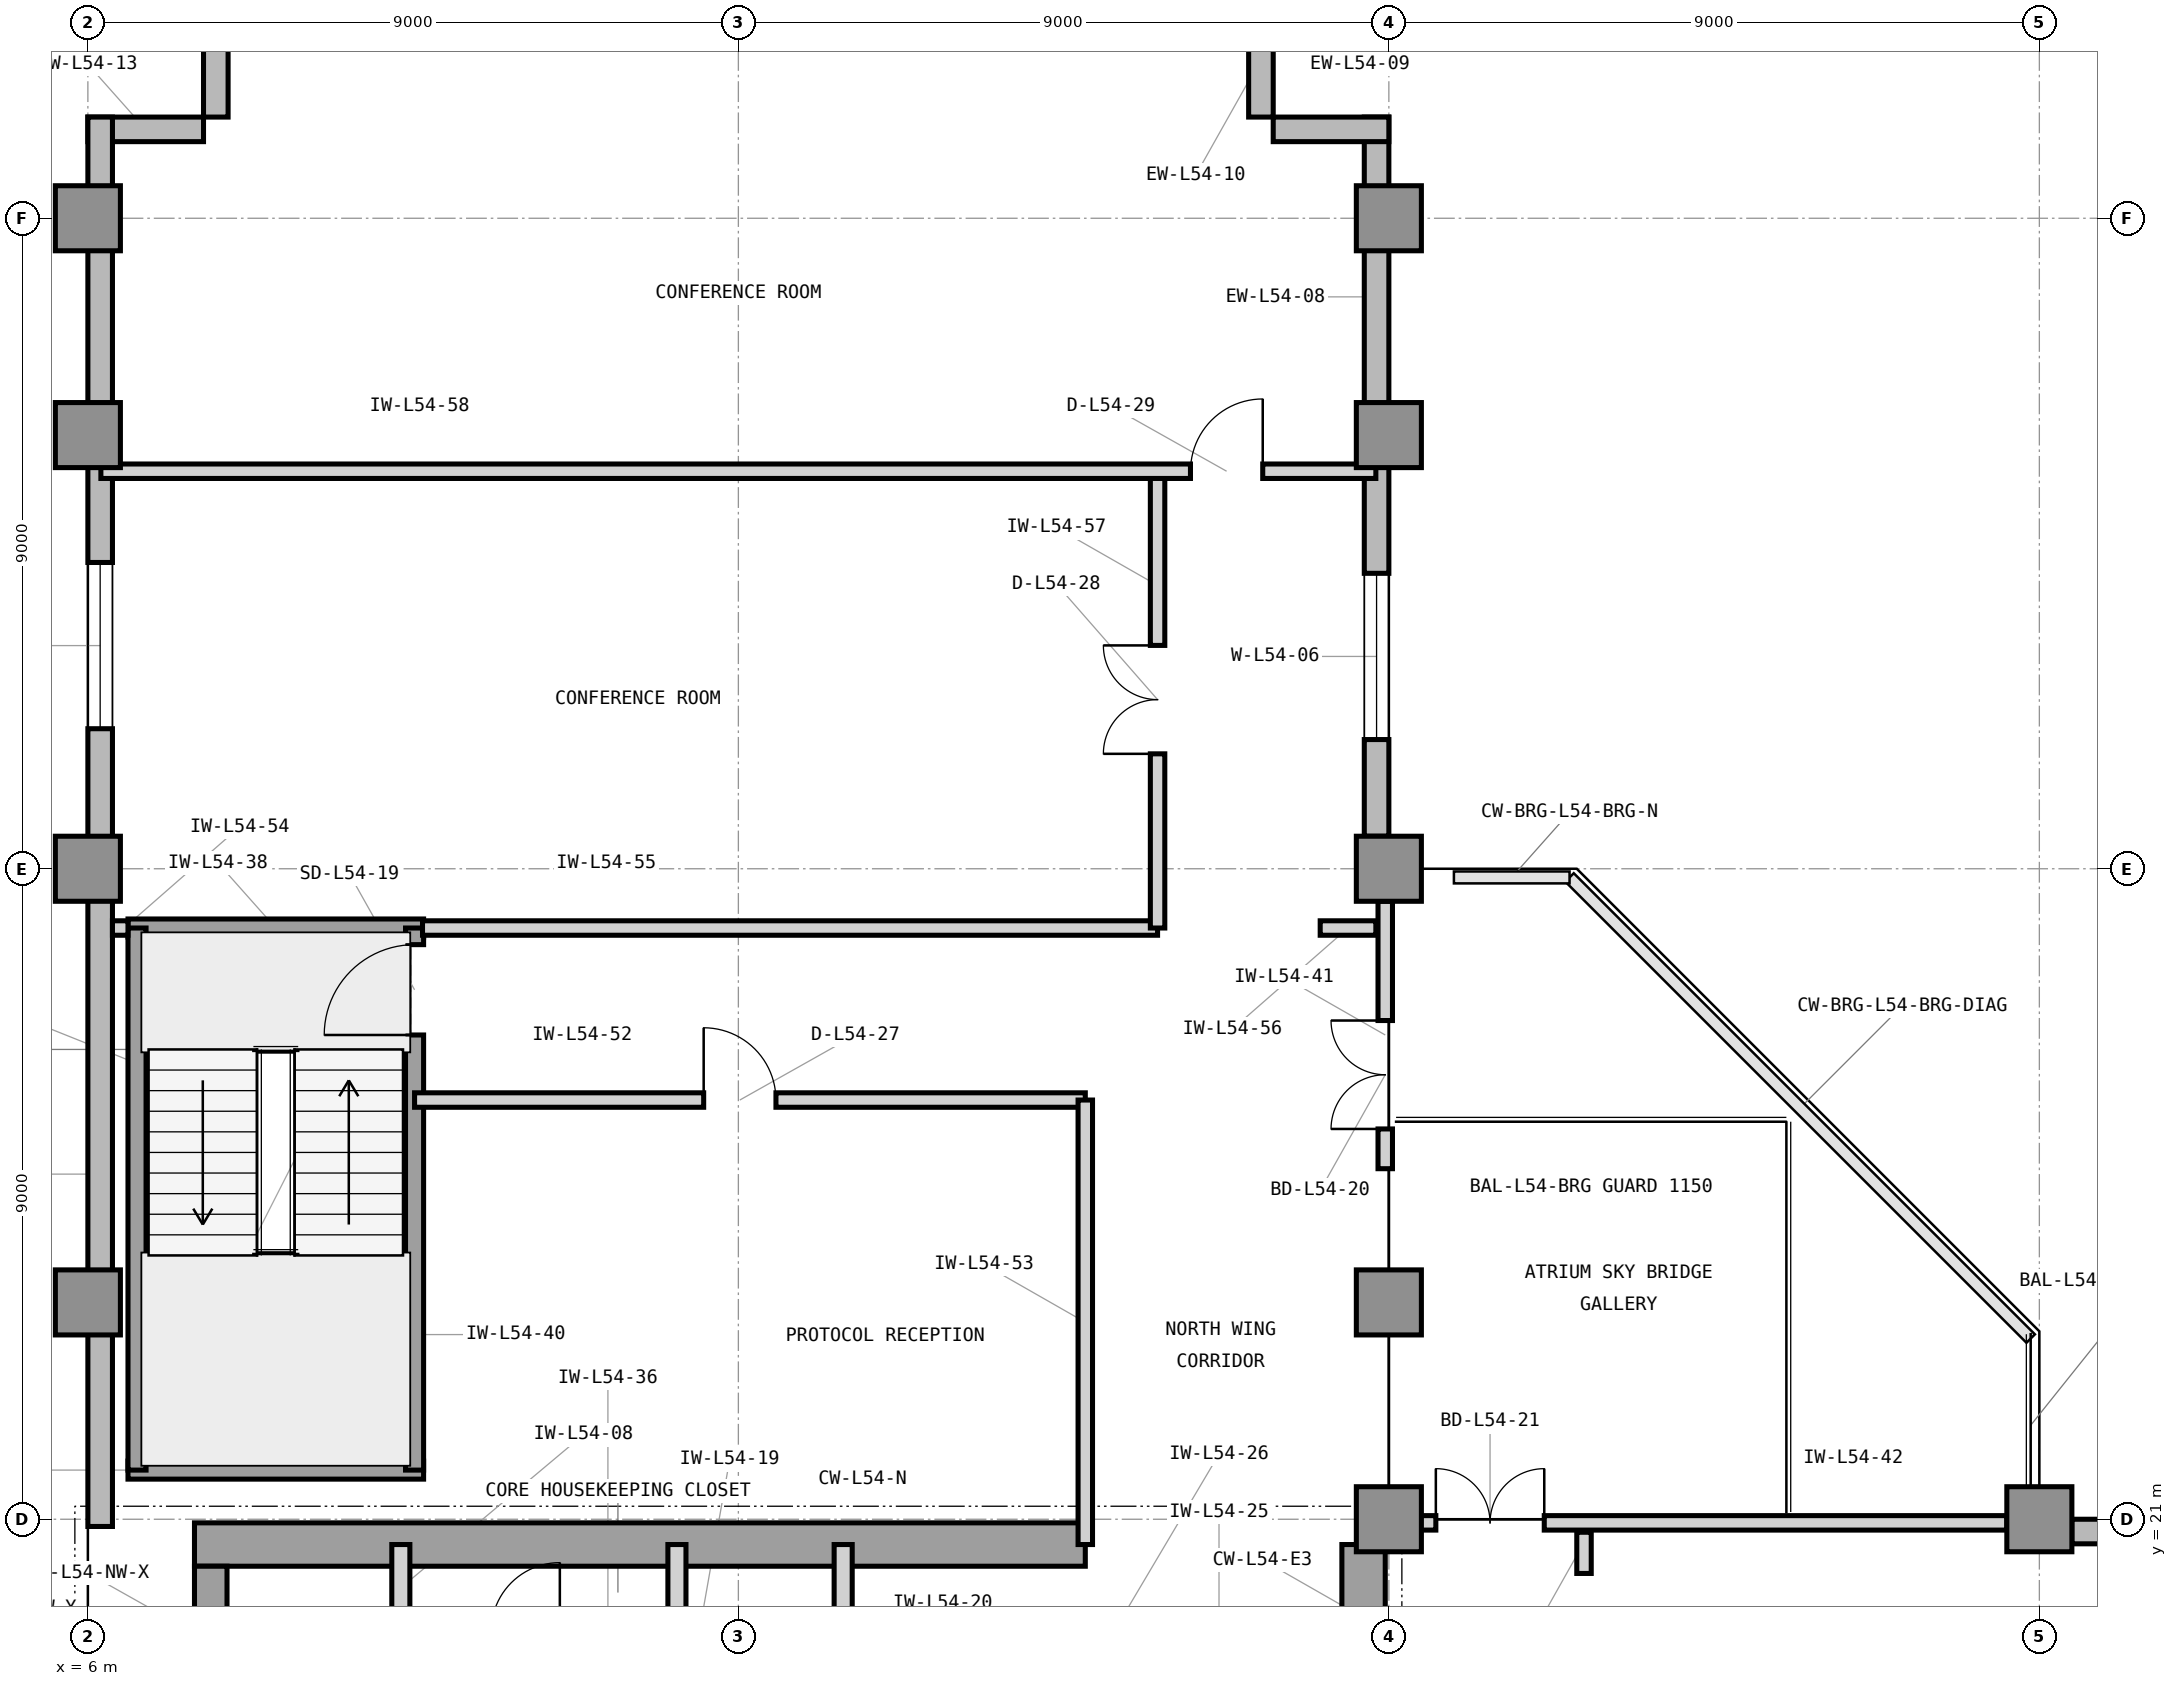
"""IFC4 building model, lengths in metres.
Left out: names, types, materials, properties, quantities, classifications, styles, units other than length and angle.
Written with IfcOpenShell. Run it as: python <this file> out.ifc"""

import sys

from ifc_helpers import new_model, si_unit, direction, frame, frame_2d, origin, origin_2d, place, context, subcontext, project, spatial, rectangle, extrude, element, fill, save


model = new_model("IFC4")
c1 = context("Model", 3, precision=1e-05, world=origin(), true_north=direction((0.0, 1.0)))
c2 = subcontext(c1, "Body", "Model", "MODEL_VIEW")
j1 = project(units=[si_unit("LENGTHUNIT", "METRE"), si_unit("PLANEANGLEUNIT", "RADIAN")], contexts=[c1])
p1 = place(None, origin())
s1 = spatial("IfcSite", under=j1, at=p1, CompositionType="ELEMENT")
p2 = place(p1, origin())
s2 = spatial("IfcBuilding", under=s1, at=p2, CompositionType="ELEMENT")
p3 = place(p2, frame((0.0, 0.0, 222.9)))
s3 = spatial("IfcBuildingStorey", under=s2, at=p3, CompositionType="ELEMENT", Elevation=222.9)
p4 = place(p3, frame((7.475, 20.65, 0.0), z_axis=(0.0, 0.0, 1.0), x_axis=(1.0, 0.0, 0.0)))
e1 = element("IfcWall", 1, at=p4, inside=s3, PredefinedType="SHEAR", context=c2, shape_type="SweptSolid", body=[
    extrude(rectangle(XDim=12.325, YDim=0.6, at=frame_2d((6.163, 0.0))), origin(), (0.0, 0.0, 1.0), 3.9),
])
p5 = place(p3, frame((23.65, 16.6, 0.0), z_axis=(0.0, 0.0, 1.0), x_axis=(0.0, 1.0, 0.0)))
e2 = element("IfcWall", 2, at=p5, inside=s3, PredefinedType="SHEAR", context=c2, shape_type="SweptSolid", body=[
    extrude(rectangle(XDim=4.05, YDim=0.6, at=frame_2d((2.025, 0.0))), origin(), (0.0, 0.0, 1.0), 3.9),
])
p6 = place(p3, frame((7.7, 19.575, 0.0), z_axis=(0.0, 0.0, 1.0), x_axis=(0.0, 1.0, 0.0)))
e3 = element("IfcWall", 3, at=p6, inside=s3, PredefinedType="SHEAR", context=c2, shape_type="SweptSolid", body=[
    extrude(rectangle(XDim=0.775, YDim=0.45, at=frame_2d((0.388, 0.0))), origin(), (0.0, 0.0, 1.0), 3.9),
])
for number, where, z_axis, x_axis in (
    (4, (24.0, 21.0, 0.0), (0.0, 0.0, 1.0), (1.0, 0.0, 0.0)),
    (5, (33.0, 21.0, 0.0), (0.0, 0.0, 1.0), (1.0, 0.0, 0.0)),
    (6, (6.0, 24.0, 0.0), (0.0, 0.0, 1.0), (1.0, 0.0, 0.0)),
    (7, (24.0, 24.0, 0.0), (0.0, 0.0, 1.0), (1.0, 0.0, 0.0)),
    (8, (6.0, 30.0, 0.0), (0.0, 0.0, 1.0), (1.0, 0.0, 0.0)),
    (9, (24.0, 30.0, 0.0), (0.0, 0.0, 1.0), (1.0, 0.0, 0.0)),
    (10, (6.0, 36.0, 0.0), (0.0, 0.0, 1.0), (1.0, 0.0, 0.0)),
    (11, (24.0, 36.0, 0.0), (0.0, 0.0, 1.0), (1.0, 0.0, 0.0)),
    (12, (6.0, 39.0, 0.0), (0.0, 0.0, 1.0), (1.0, 0.0, 0.0)),
    (13, (24.0, 39.0, 0.0), (0.0, 0.0, 1.0), (1.0, 0.0, 0.0)),
):
    element("IfcColumn", number, at=place(p3, frame(where, z_axis=z_axis, x_axis=x_axis)), inside=s3, PredefinedType="COLUMN", context=c2, shape_type="SweptSolid", body=[
        extrude(rectangle(XDim=0.9, YDim=0.9, at=origin_2d()), origin(), (0.0, 0.0, 1.0), 3.9),
    ])
p7 = place(p3, frame((55.4, 20.83, 0.0), z_axis=(0.0, 0.0, 1.0), x_axis=(-1.0, 0.0, 0.0)))
e14 = element("IfcWall", 14, at=p7, inside=s3, PredefinedType="STANDARD", context=c2, shape_type="SweptSolid", body=[
    extrude(rectangle(XDim=21.95, YDim=0.34, at=frame_2d((10.975, 0.0))), origin(), (0.0, 0.0, 1.0), 3.62),
])
p8 = place(p7, frame((18.406, 0.0, 0.9)))
e15 = element("IfcOpeningElement", 15, at=p8, cuts=e14, PredefinedType="OPENING", context=c2, shape_type="SweptSolid", body=[
    extrude(rectangle(XDim=1.6, YDim=2.2, at=frame_2d((0.8, 1.1))), frame((0.0, 0.18, 0.0), z_axis=(0.0, -1.0, 0.0), x_axis=(1.0, 0.0, 0.0)), (0.0, 0.0, 1.0), 0.36),
])
p9 = place(p3, frame((23.83, 30.45, 0.0), z_axis=(0.0, 0.0, 1.0), x_axis=(0.0, 1.0, 0.0)))
e16 = element("IfcWall", 16, at=p9, inside=s3, PredefinedType="STANDARD", context=c2, shape_type="SweptSolid", body=[
    extrude(rectangle(XDim=9.95, YDim=0.34, at=frame_2d((4.975, 0.0))), origin(), (0.0, 0.0, 1.0), 3.62),
])
p10 = place(p9, frame((1.337, 0.0, 0.9)))
e17 = element("IfcOpeningElement", 17, at=p10, cuts=e16, PredefinedType="OPENING", context=c2, shape_type="SweptSolid", body=[
    extrude(rectangle(XDim=2.3, YDim=2.2, at=frame_2d((1.15, 1.1))), frame((0.0, 0.18, 0.0), z_axis=(0.0, -1.0, 0.0), x_axis=(1.0, 0.0, 0.0)), (0.0, 0.0, 1.0), 0.36),
])
for number, where, z_axis, x_axis in (
    (18, (24.0, 40.23, 0.0), (0.0, 0.0, 1.0), (-1.0, 0.0, 0.0)),
    (19, (22.23, 40.4, 0.0), (0.0, 0.0, 1.0), (0.0, 1.0, 0.0)),
    (20, (7.77, 42.0, 0.0), (0.0, 0.0, 1.0), (0.0, -1.0, 0.0)),
    (21, (7.6, 40.23, 0.0), (0.0, 0.0, 1.0), (-1.0, 0.0, 0.0)),
):
    element("IfcWall", number, at=place(p3, frame(where, z_axis=z_axis, x_axis=x_axis)), inside=s3, PredefinedType="STANDARD", context=c2, shape_type="SweptSolid", body=[
        extrude(rectangle(XDim=1.6, YDim=0.34, at=frame_2d((0.8, 0.0))), origin(), (0.0, 0.0, 1.0), 3.62),
    ])
p11 = place(p3, frame((6.17, 40.4, 0.0), z_axis=(0.0, 0.0, 1.0), x_axis=(0.0, -1.0, 0.0)))
e22 = element("IfcWall", 22, at=p11, inside=s3, PredefinedType="STANDARD", context=c2, shape_type="SweptSolid", body=[
    extrude(rectangle(XDim=19.5, YDim=0.34, at=frame_2d((9.75, 0.0))), origin(), (0.0, 0.0, 1.0), 3.62),
])
p12 = place(p11, frame((6.163, 0.0, 0.9)))
e23 = element("IfcOpeningElement", 23, at=p12, cuts=e22, PredefinedType="OPENING", context=c2, shape_type="SweptSolid", body=[
    extrude(rectangle(XDim=2.3, YDim=2.2, at=frame_2d((1.15, 1.1))), frame((0.0, 0.18, 0.0), z_axis=(0.0, -1.0, 0.0), x_axis=(1.0, 0.0, 0.0)), (0.0, 0.0, 1.0), 0.36),
])
p13 = place(p3, frame((10.33, 19.45, 0.0), z_axis=(0.0, 0.0, 1.0), x_axis=(0.0, 1.0, 0.0)))
e24 = element("IfcWall", 24, at=p13, inside=s3, PredefinedType="PARTITIONING", context=c2, shape_type="SweptSolid", body=[
    extrude(rectangle(XDim=1.2, YDim=0.25, at=frame_2d((0.6, 0.0))), origin(), (0.0, 0.0, 1.0), 2.837),
])
for number, where, z_axis, x_axis in (
    (25, (14.15, 16.7, 0.0), (0.0, 0.0, 1.0), (0.0, 1.0, 0.0)),
    (26, (16.45, 16.7, 0.0), (0.0, 0.0, 1.0), (0.0, 1.0, 0.0)),
):
    element("IfcWall", number, at=place(p3, frame(where, z_axis=z_axis, x_axis=x_axis)), inside=s3, PredefinedType="PARTITIONING", context=c2, shape_type="SweptSolid", body=[
        extrude(rectangle(XDim=3.95, YDim=0.25, at=frame_2d((1.975, 0.0))), origin(), (0.0, 0.0, 1.0), 3.61),
    ])
for number, where, z_axis, x_axis in (
    (27, (6.555, 21.68, 0.0), (0.0, 0.0, 1.0), (1.0, 0.0, 0.0)),
    (28, (6.555, 29.18, 0.0), (0.0, 0.0, 1.0), (1.0, 0.0, 0.0)),
):
    element("IfcWall", number, at=place(p3, frame(where, z_axis=z_axis, x_axis=x_axis)), inside=s3, PredefinedType="SHEAR", context=c2, shape_type="SweptSolid", body=[
        extrude(rectangle(XDim=4.09, YDim=0.25, at=frame_2d((2.045, 0.0))), origin(), (0.0, 0.0, 1.0), 3.9),
    ])
p14 = place(p3, frame((6.68, 21.68, 0.0), z_axis=(0.0, 0.0, 1.0), x_axis=(0.0, 1.0, 0.0)))
e29 = element("IfcWall", 29, at=p14, inside=s3, PredefinedType="SHEAR", context=c2, shape_type="SweptSolid", body=[
    extrude(rectangle(XDim=7.5, YDim=0.25, at=frame_2d((3.75, 0.0))), origin(), (0.0, 0.0, 1.0), 3.9),
])
p15 = place(p3, frame((10.52, 21.68, 0.0), z_axis=(0.0, 0.0, 1.0), x_axis=(0.0, 1.0, 0.0)))
e30 = element("IfcWall", 30, at=p15, inside=s3, PredefinedType="SHEAR", context=c2, shape_type="SweptSolid", body=[
    extrude(rectangle(XDim=7.5, YDim=0.25, at=frame_2d((3.75, 0.0))), origin(), (0.0, 0.0, 1.0), 3.9),
])
p16 = place(p15, frame((6.02, 0.0, 0.0)))
e31 = element("IfcOpeningElement", 31, at=p16, cuts=e30, PredefinedType="OPENING", context=c2, shape_type="SweptSolid", body=[
    extrude(rectangle(XDim=1.25, YDim=2.2, at=frame_2d((0.625, 1.1))), frame((0.0, 0.135, 0.0), z_axis=(0.0, -1.0, 0.0), x_axis=(1.0, 0.0, 0.0)), (0.0, 0.0, 1.0), 0.27),
])
p17 = place(p3, frame((23.95, 25.85, 0.0), z_axis=(0.0, 0.0, 1.0), x_axis=(0.0, 1.0, 0.0)))
e32 = element("IfcWall", 32, at=p17, inside=s3, PredefinedType="PARTITIONING", context=c2, shape_type="SweptSolid", body=[
    extrude(rectangle(XDim=3.7, YDim=0.2, at=frame_2d((1.85, 0.0))), origin(), (0.0, 0.0, 1.0), 2.993),
])
p18 = place(p17, frame((0.55, 0.0, 0.0)))
e33 = element("IfcOpeningElement", 33, at=p18, cuts=e32, PredefinedType="OPENING", context=c2, shape_type="SweptSolid", body=[
    extrude(rectangle(XDim=1.5, YDim=2.3, at=frame_2d((0.75, 1.15))), frame((0.0, 0.11, 0.0), z_axis=(0.0, -1.0, 0.0), x_axis=(1.0, 0.0, 0.0)), (0.0, 0.0, 1.0), 0.22),
])
p19 = place(p3, frame((24.05, 20.95, 0.0), z_axis=(0.0, 0.0, 1.0), x_axis=(1.0, 0.0, 0.0)))
e34 = element("IfcWall", 34, at=p19, inside=s3, PredefinedType="PARTITIONING", context=c2, shape_type="SweptSolid", body=[
    extrude(rectangle(XDim=8.5, YDim=0.2, at=frame_2d((4.25, 0.0))), origin(), (0.0, 0.0, 1.0), 2.993),
])
p20 = place(p19, frame((0.6, 0.0, 0.0)))
e35 = element("IfcOpeningElement", 35, at=p20, cuts=e34, PredefinedType="OPENING", context=c2, shape_type="SweptSolid", body=[
    extrude(rectangle(XDim=1.5, YDim=2.3, at=frame_2d((0.75, 1.15))), frame((0.0, 0.11, 0.0), z_axis=(0.0, -1.0, 0.0), x_axis=(1.0, 0.0, 0.0)), (0.0, 0.0, 1.0), 0.22),
])
p21 = place(p3, frame((26.7, 20.25, 0.0), z_axis=(0.0, 0.0, 1.0), x_axis=(0.0, 1.0, 0.0)))
e36 = element("IfcWall", 36, at=p21, inside=s3, PredefinedType="PARTITIONING", context=c2, shape_type="SweptSolid", body=[
    extrude(rectangle(XDim=0.57, YDim=0.2, at=frame_2d((0.285, 0.0))), origin(), (0.0, 0.0, 1.0), 3.61),
])
p22 = place(p3, frame((10.52, 26.8, 0.0), z_axis=(0.0, 0.0, 1.0), x_axis=(1.0, 0.0, 0.0)))
e37 = element("IfcWall", 37, at=p22, inside=s3, PredefinedType="PARTITIONING", context=c2, shape_type="SweptSolid", body=[
    extrude(rectangle(XDim=9.28, YDim=0.2, at=frame_2d((4.64, 0.0))), origin(), (0.0, 0.0, 1.0), 3.61),
])
p23 = place(p22, frame((4.0, 0.0, 0.0)))
e38 = element("IfcOpeningElement", 38, at=p23, cuts=e37, PredefinedType="OPENING", context=c2, shape_type="SweptSolid", body=[
    extrude(rectangle(XDim=1.0, YDim=2.15, at=frame_2d((0.5, 1.075))), frame((0.0, 0.11, 0.0), z_axis=(0.0, -1.0, 0.0), x_axis=(1.0, 0.0, 0.0)), (0.0, 0.0, 1.0), 0.22),
])
p24 = place(p3, frame((19.8, 20.65, 0.0), z_axis=(0.0, 0.0, 1.0), x_axis=(0.0, 1.0, 0.0)))
e39 = element("IfcWall", 39, at=p24, inside=s3, PredefinedType="PARTITIONING", context=c2, shape_type="SweptSolid", body=[
    extrude(rectangle(XDim=6.15, YDim=0.2, at=frame_2d((3.075, 0.0))), origin(), (0.0, 0.0, 1.0), 3.61),
])
p25 = place(p3, frame((6.34, 29.18, 0.0), z_axis=(0.0, 0.0, 1.0), x_axis=(1.0, 0.0, 0.0)))
e40 = element("IfcWall", 40, at=p25, inside=s3, PredefinedType="PARTITIONING", context=c2, shape_type="SweptSolid", body=[
    extrude(rectangle(XDim=0.215, YDim=0.2, at=frame_2d((0.107, 0.0))), origin(), (0.0, 0.0, 1.0), 3.61),
])
p26 = place(p3, frame((10.63, 29.18, 0.0), z_axis=(0.0, 0.0, 1.0), x_axis=(1.0, 0.0, 0.0)))
e41 = element("IfcWall", 41, at=p26, inside=s3, PredefinedType="PARTITIONING", context=c2, shape_type="SweptSolid", body=[
    extrude(rectangle(XDim=10.17, YDim=0.2, at=frame_2d((5.085, 0.0))), origin(), (0.0, 0.0, 1.0), 3.61),
])
p27 = place(p3, frame((23.05, 29.18, 0.0), z_axis=(0.0, 0.0, 1.0), x_axis=(1.0, 0.0, 0.0)))
e42 = element("IfcWall", 42, at=p27, inside=s3, PredefinedType="PARTITIONING", context=c2, shape_type="SweptSolid", body=[
    extrude(rectangle(XDim=0.77, YDim=0.2, at=frame_2d((0.385, 0.0))), origin(), (0.0, 0.0, 1.0), 3.61),
])
p28 = place(p3, frame((20.8, 29.18, 0.0), z_axis=(0.0, 0.0, 1.0), x_axis=(0.0, 1.0, 0.0)))
e43 = element("IfcWall", 43, at=p28, inside=s3, PredefinedType="PARTITIONING", context=c2, shape_type="SweptSolid", body=[
    extrude(rectangle(XDim=6.32, YDim=0.2, at=frame_2d((3.16, 0.0))), origin(), (0.0, 0.0, 1.0), 3.61),
])
p29 = place(p28, frame((2.41, 0.0, 0.0)))
e44 = element("IfcOpeningElement", 44, at=p29, cuts=e43, PredefinedType="OPENING", context=c2, shape_type="SweptSolid", body=[
    extrude(rectangle(XDim=1.5, YDim=2.3, at=frame_2d((0.75, 1.15))), frame((0.0, 0.11, 0.0), z_axis=(0.0, -1.0, 0.0), x_axis=(1.0, 0.0, 0.0)), (0.0, 0.0, 1.0), 0.22),
])
p30 = place(p3, frame((6.18, 35.5, 0.0), z_axis=(0.0, 0.0, 1.0), x_axis=(1.0, 0.0, 0.0)))
e45 = element("IfcWall", 45, at=p30, inside=s3, PredefinedType="PARTITIONING", context=c2, shape_type="SweptSolid", body=[
    extrude(rectangle(XDim=17.64, YDim=0.2, at=frame_2d((8.82, 0.0))), origin(), (0.0, 0.0, 1.0), 3.61),
])
p31 = place(p30, frame((15.075, 0.0, 0.0)))
e46 = element("IfcOpeningElement", 46, at=p31, cuts=e45, PredefinedType="OPENING", context=c2, shape_type="SweptSolid", body=[
    extrude(rectangle(XDim=1.0, YDim=2.15, at=frame_2d((0.5, 1.075))), frame((0.0, 0.11, 0.0), z_axis=(0.0, -1.0, 0.0), x_axis=(1.0, 0.0, 0.0)), (0.0, 0.0, 1.0), 0.22),
])
p32 = place(p10, origin())
e47 = element("IfcWindow", 47, at=p32, inside=s3, PartitioningType="SINGLE_PANEL", PredefinedType="WINDOW", context=c2, shape_type="SweptSolid", body=[
    extrude(rectangle(XDim=2.3, YDim=2.2, at=frame_2d((1.15, 1.1))), frame((0.0, 0.11, 0.0), z_axis=(0.0, -1.0, 0.0), x_axis=(1.0, 0.0, 0.0)), (0.0, 0.0, 1.0), 0.06),
])
fill(e17, e47)
p33 = place(p12, origin())
e48 = element("IfcWindow", 48, at=p33, inside=s3, PartitioningType="SINGLE_PANEL", PredefinedType="WINDOW", context=c2, shape_type="SweptSolid", body=[
    extrude(rectangle(XDim=2.3, YDim=2.2, at=frame_2d((1.15, 1.1))), frame((0.0, 0.11, 0.0), z_axis=(0.0, -1.0, 0.0), x_axis=(1.0, 0.0, 0.0)), (0.0, 0.0, 1.0), 0.06),
])
fill(e23, e48)
p34 = place(p16, origin())
e49 = element("IfcDoor", 49, at=p34, inside=s3, OperationType="SINGLE_SWING_LEFT", PredefinedType="DOOR", context=c2, shape_type="SweptSolid", body=[
    extrude(rectangle(XDim=1.25, YDim=2.2, at=frame_2d((0.625, 1.1))), frame((0.0, 0.025, 0.0), z_axis=(0.0, -1.0, 0.0), x_axis=(1.0, 0.0, 0.0)), (0.0, 0.0, 1.0), 0.05),
])
fill(e31, e49)
p35 = place(p18, origin())
e50 = element("IfcDoor", 50, at=p35, inside=s3, OperationType="DOUBLE_DOOR_SINGLE_SWING", PredefinedType="DOOR", context=c2, shape_type="SweptSolid", body=[
    extrude(rectangle(XDim=1.5, YDim=2.3, at=frame_2d((0.75, 1.15))), frame((0.0, 0.025, 0.0), z_axis=(0.0, -1.0, 0.0), x_axis=(1.0, 0.0, 0.0)), (0.0, 0.0, 1.0), 0.05),
])
fill(e33, e50)
p36 = place(p20, origin())
e51 = element("IfcDoor", 51, at=p36, inside=s3, OperationType="DOUBLE_DOOR_SINGLE_SWING", PredefinedType="DOOR", context=c2, shape_type="SweptSolid", body=[
    extrude(rectangle(XDim=1.5, YDim=2.3, at=frame_2d((0.75, 1.15))), frame((0.0, 0.025, 0.0), z_axis=(0.0, -1.0, 0.0), x_axis=(1.0, 0.0, 0.0)), (0.0, 0.0, 1.0), 0.05),
])
fill(e35, e51)
p37 = place(p23, origin())
e52 = element("IfcDoor", 52, at=p37, inside=s3, OperationType="SINGLE_SWING_LEFT", PredefinedType="DOOR", context=c2, shape_type="SweptSolid", body=[
    extrude(rectangle(XDim=1.0, YDim=2.15, at=frame_2d((0.5, 1.075))), frame((0.0, 0.025, 0.0), z_axis=(0.0, -1.0, 0.0), x_axis=(1.0, 0.0, 0.0)), (0.0, 0.0, 1.0), 0.05),
])
fill(e38, e52)
p38 = place(p29, origin())
e53 = element("IfcDoor", 53, at=p38, inside=s3, OperationType="DOUBLE_DOOR_SINGLE_SWING", PredefinedType="DOOR", context=c2, shape_type="SweptSolid", body=[
    extrude(rectangle(XDim=1.5, YDim=2.3, at=frame_2d((0.75, 1.15))), frame((0.0, 0.025, 0.0), z_axis=(0.0, -1.0, 0.0), x_axis=(1.0, 0.0, 0.0)), (0.0, 0.0, 1.0), 0.05),
])
fill(e44, e53)
p39 = place(p31, origin())
e54 = element("IfcDoor", 54, at=p39, inside=s3, OperationType="SINGLE_SWING_RIGHT", PredefinedType="DOOR", context=c2, shape_type="SweptSolid", body=[
    extrude(rectangle(XDim=1.0, YDim=2.15, at=frame_2d((0.5, 1.075))), frame((0.0, 0.025, 0.0), z_axis=(0.0, -1.0, 0.0), x_axis=(1.0, 0.0, 0.0)), (0.0, 0.0, 1.0), 0.05),
])
fill(e46, e54)
save(model, sys.argv[1])
